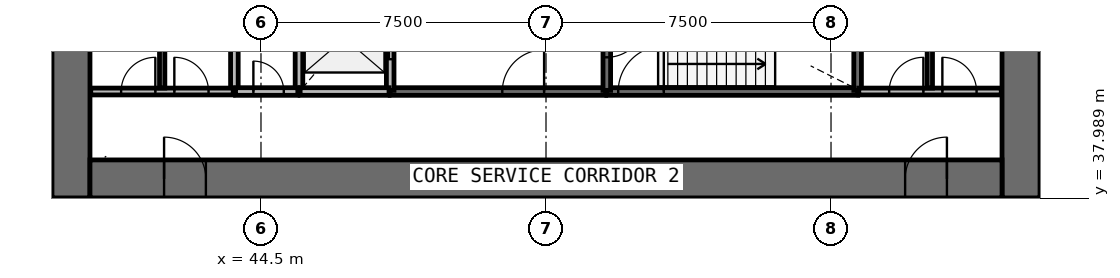
"""IFC4 building model, lengths in metres.
Left out: names, types, materials, properties, quantities, classifications, styles, units other than length and angle.
Written with IfcOpenShell. Run it as: python <this file> out.ifc"""

import sys

from ifc_helpers import new_model, si_unit, direction, frame, frame_2d, origin, place, context, subcontext, project, spatial, rectangle, extrude, source, transform, mapped, element, fill, save


model = new_model("IFC4")
c1 = context("Model", 3, precision=1e-05, world=origin(), true_north=direction((0.0, 1.0)))
c2 = subcontext(c1, "Body", "Model", "MODEL_VIEW")
j1 = project(units=[si_unit("LENGTHUNIT", "METRE"), si_unit("PLANEANGLEUNIT", "RADIAN")], contexts=[c1])
p1 = place(None, origin())
s1 = spatial("IfcSite", under=j1, at=p1, CompositionType="ELEMENT")
p2 = place(p1, origin())
s2 = spatial("IfcBuilding", under=s1, at=p2, CompositionType="ELEMENT")
p3 = place(p2, frame((0.0, 0.0, 66.6)))
s3 = spatial("IfcBuildingStorey", under=s2, at=p3, CompositionType="ELEMENT", Elevation=66.6)
p4 = place(p3, frame((64.5, 38.0, 0.0), z_axis=(0.0, 0.0, 1.0), x_axis=(0.0, 1.0, 0.0)))
e1 = element("IfcWall", 1, at=p4, inside=s3, PredefinedType="SHEAR", context=c2, shape_type="SweptSolid", body=[
    extrude(rectangle(XDim=20.0, YDim=1.0, at=frame_2d((10.0, 0.0))), origin(), (0.0, 0.0, 1.0), 4.4),
])
p5 = place(p4, frame((9.1, 0.0, 0.0)))
e2 = element("IfcOpeningElement", 2, at=p5, cuts=e1, PredefinedType="OPENING", context=c2, shape_type="SweptSolid", body=[
    extrude(rectangle(XDim=1.8, YDim=2.1, at=frame_2d((0.9, 1.05))), frame((0.0, 0.51, 0.0), z_axis=(0.0, -1.0, 0.0), x_axis=(1.0, 0.0, 0.0)), (0.0, 0.0, 1.0), 1.02),
])
p6 = place(p3, frame((39.5, 58.0, 0.0), z_axis=(0.0, 0.0, 1.0), x_axis=(0.0, -1.0, 0.0)))
e3 = element("IfcWall", 3, at=p6, inside=s3, PredefinedType="SHEAR", context=c2, shape_type="SweptSolid", body=[
    extrude(rectangle(XDim=20.0, YDim=1.0, at=frame_2d((10.0, 0.0))), origin(), (0.0, 0.0, 1.0), 4.4),
])
p7 = place(p6, frame((9.1, 0.0, 0.0)))
e4 = element("IfcOpeningElement", 4, at=p7, cuts=e3, PredefinedType="OPENING", context=c2, shape_type="SweptSolid", body=[
    extrude(rectangle(XDim=1.8, YDim=2.1, at=frame_2d((0.9, 1.05))), frame((0.0, 0.51, 0.0), z_axis=(0.0, -1.0, 0.0), x_axis=(1.0, 0.0, 0.0)), (0.0, 0.0, 1.0), 1.02),
])
p8 = place(p3, frame((40.0, 38.5, 0.0), z_axis=(0.0, 0.0, 1.0), x_axis=(1.0, 0.0, 0.0)))
e5 = element("IfcWall", 5, at=p8, inside=s3, PredefinedType="SHEAR", context=c2, shape_type="SweptSolid", body=[
    extrude(rectangle(XDim=24.0, YDim=1.0, at=frame_2d((12.0, 0.0))), origin(), (0.0, 0.0, 1.0), 4.4),
])
p9 = place(p8, frame((21.45, 0.0, 0.0)))
e6 = element("IfcOpeningElement", 6, at=p9, cuts=e5, PredefinedType="OPENING", context=c2, shape_type="SweptSolid", body=[
    extrude(rectangle(XDim=1.1, YDim=2.1, at=frame_2d((0.55, 1.05))), frame((0.0, 0.51, 0.0), z_axis=(0.0, -1.0, 0.0), x_axis=(1.0, 0.0, 0.0)), (0.0, 0.0, 1.0), 1.02),
])
p10 = place(p8, frame((1.95, 0.0, 0.0)))
e7 = element("IfcOpeningElement", 7, at=p10, cuts=e5, PredefinedType="OPENING", context=c2, shape_type="SweptSolid", body=[
    extrude(rectangle(XDim=1.1, YDim=2.1, at=frame_2d((0.55, 1.05))), frame((0.0, 0.51, 0.0), z_axis=(0.0, -1.0, 0.0), x_axis=(1.0, 0.0, 0.0)), (0.0, 0.0, 1.0), 1.02),
])
p11 = place(p3, frame((53.6, 40.8, 0.0), z_axis=(0.0, 0.0, 1.0), x_axis=(1.0, 0.0, 0.0)))
e8 = element("IfcWall", 8, at=p11, inside=s3, PredefinedType="SOLIDWALL", context=c2, shape_type="SweptSolid", body=[
    extrude(rectangle(XDim=6.6, YDim=0.2, at=frame_2d((3.3, 0.0))), origin(), (0.0, 0.0, 1.0), 3.95),
])
p12 = place(p11, frame((0.3, 0.0, 0.0)))
e9 = element("IfcOpeningElement", 9, at=p12, cuts=e8, PredefinedType="OPENING", context=c2, shape_type="SweptSolid", body=[
    extrude(rectangle(XDim=1.2, YDim=2.1, at=frame_2d((0.6, 1.05))), frame((0.0, 0.11, 0.0), z_axis=(0.0, -1.0, 0.0), x_axis=(1.0, 0.0, 0.0)), (0.0, 0.0, 1.0), 0.22),
])
p13 = place(p3, frame((47.9, 40.8, 0.0), z_axis=(0.0, 0.0, 1.0), x_axis=(1.0, 0.0, 0.0)))
e10 = element("IfcWall", 10, at=p13, inside=s3, PredefinedType="SOLIDWALL", context=c2, shape_type="SweptSolid", body=[
    extrude(rectangle(XDim=5.67, YDim=0.2, at=frame_2d((2.835, 0.0))), origin(), (0.0, 0.0, 1.0), 3.95),
])
p14 = place(p13, frame((2.95, 0.0, 0.0)))
e11 = element("IfcOpeningElement", 11, at=p14, cuts=e10, PredefinedType="OPENING", context=c2, shape_type="SweptSolid", body=[
    extrude(rectangle(XDim=1.1, YDim=2.1, at=frame_2d((0.55, 1.05))), frame((0.0, 0.11, 0.0), z_axis=(0.0, -1.0, 0.0), x_axis=(1.0, 0.0, 0.0)), (0.0, 0.0, 1.0), 0.22),
])
for number, where, z_axis, x_axis in (
    (12, (43.8, 43.6, 0.0), (0.0, 0.0, 1.0), (0.0, -1.0, 0.0)),
    (13, (45.5, 43.6, 0.0), (0.0, 0.0, 1.0), (0.0, -1.0, 0.0)),
):
    element("IfcWall", number, at=place(p3, frame(where, z_axis=z_axis, x_axis=x_axis)), inside=s3, PredefinedType="SOLIDWALL", context=c2, shape_type="SweptSolid", body=[
        extrude(rectangle(XDim=2.8, YDim=0.2, at=frame_2d((1.4, 0.0))), origin(), (0.0, 0.0, 1.0), 3.95),
    ])
p15 = place(p3, frame((47.9, 40.83, 0.0), z_axis=(0.0, 0.0, 1.0), x_axis=(0.0, 1.0, 0.0)))
e14 = element("IfcWall", 14, at=p15, inside=s3, PredefinedType="SOLIDWALL", context=c2, shape_type="SweptSolid", body=[
    extrude(rectangle(XDim=2.77, YDim=0.2, at=frame_2d((1.385, 0.0))), origin(), (0.0, 0.0, 1.0), 3.95),
])
p16 = place(p15, frame((0.82, 0.0, 0.0)))
e15 = element("IfcOpeningElement", 15, at=p16, cuts=e14, PredefinedType="OPENING", context=c2, shape_type="SweptSolid", body=[
    extrude(rectangle(XDim=1.1, YDim=2.1, at=frame_2d((0.55, 1.05))), frame((0.0, 0.11, 0.0), z_axis=(0.0, -1.0, 0.0), x_axis=(1.0, 0.0, 0.0)), (0.0, 0.0, 1.0), 0.22),
])
p17 = place(p3, frame((60.2, 40.83, 0.0), z_axis=(0.0, 0.0, 1.0), x_axis=(0.0, 1.0, 0.0)))
e16 = element("IfcWall", 16, at=p17, inside=s3, PredefinedType="SOLIDWALL", context=c2, shape_type="SweptSolid", body=[
    extrude(rectangle(XDim=2.77, YDim=0.2, at=frame_2d((1.385, 0.0))), origin(), (0.0, 0.0, 1.0), 3.95),
])
p18 = place(p3, frame((53.6, 43.6, 0.0), z_axis=(0.0, 0.0, 1.0), x_axis=(0.0, -1.0, 0.0)))
e17 = element("IfcWall", 17, at=p18, inside=s3, PredefinedType="SOLIDWALL", context=c2, shape_type="SweptSolid", body=[
    extrude(rectangle(XDim=2.77, YDim=0.2, at=frame_2d((1.385, 0.0))), origin(), (0.0, 0.0, 1.0), 3.95),
])
p19 = place(p18, frame((0.9, 0.0, 0.0)))
e18 = element("IfcOpeningElement", 18, at=p19, cuts=e17, PredefinedType="OPENING", context=c2, shape_type="SweptSolid", body=[
    extrude(rectangle(XDim=1.0, YDim=2.1, at=frame_2d((0.5, 1.05))), frame((0.0, 0.11, 0.0), z_axis=(0.0, -1.0, 0.0), x_axis=(1.0, 0.0, 0.0)), (0.0, 0.0, 1.0), 0.22),
])
p20 = place(p3, frame((45.53, 40.8, 0.0), z_axis=(0.0, 0.0, 1.0), x_axis=(1.0, 0.0, 0.0)))
e19 = element("IfcWall", 19, at=p20, inside=s3, PredefinedType="SOLIDWALL", context=c2, shape_type="SweptSolid", body=[
    extrude(rectangle(XDim=2.34, YDim=0.2, at=frame_2d((1.17, 0.0))), origin(), (0.0, 0.0, 1.0), 3.95),
])
p21 = place(p3, frame((43.83, 40.8, 0.0), z_axis=(0.0, 0.0, 1.0), x_axis=(1.0, 0.0, 0.0)))
e20 = element("IfcWall", 20, at=p21, inside=s3, PredefinedType="SOLIDWALL", context=c2, shape_type="SweptSolid", body=[
    extrude(rectangle(XDim=1.64, YDim=0.2, at=frame_2d((0.82, 0.0))), origin(), (0.0, 0.0, 1.0), 3.95),
])
p22 = place(p21, frame((0.47, 0.0, 0.0)))
e21 = element("IfcOpeningElement", 21, at=p22, cuts=e20, PredefinedType="OPENING", context=c2, shape_type="SweptSolid", body=[
    extrude(rectangle(XDim=0.8, YDim=2.1, at=frame_2d((0.4, 1.05))), frame((0.0, 0.11, 0.0), z_axis=(0.0, -1.0, 0.0), x_axis=(1.0, 0.0, 0.0)), (0.0, 0.0, 1.0), 0.22),
])
p23 = place(p3, frame((40.02, 40.8, 0.0), z_axis=(0.0, 0.0, 1.0), x_axis=(1.0, 0.0, 0.0)))
e22 = element("IfcWall", 22, at=p23, inside=s3, PredefinedType="PARTITIONING", context=c2, shape_type="SweptSolid", body=[
    extrude(rectangle(XDim=3.75, YDim=0.18, at=frame_2d((1.875, 0.0))), origin(), (0.0, 0.0, 1.0), 3.95),
])
p24 = place(p23, frame((0.8, 0.0, 0.0)))
e23 = element("IfcOpeningElement", 23, at=p24, cuts=e22, PredefinedType="OPENING", context=c2, shape_type="SweptSolid", body=[
    extrude(rectangle(XDim=0.9, YDim=2.1, at=frame_2d((0.45, 1.05))), frame((0.0, 0.1, 0.0), z_axis=(0.0, -1.0, 0.0), x_axis=(1.0, 0.0, 0.0)), (0.0, 0.0, 1.0), 0.2),
])
p25 = place(p23, frame((2.2, 0.0, 0.0)))
e24 = element("IfcOpeningElement", 24, at=p25, cuts=e22, PredefinedType="OPENING", context=c2, shape_type="SweptSolid", body=[
    extrude(rectangle(XDim=0.9, YDim=2.1, at=frame_2d((0.45, 1.05))), frame((0.0, 0.1, 0.0), z_axis=(0.0, -1.0, 0.0), x_axis=(1.0, 0.0, 0.0)), (0.0, 0.0, 1.0), 0.2),
])
p26 = place(p3, frame((60.23, 40.8, 0.0), z_axis=(0.0, 0.0, 1.0), x_axis=(1.0, 0.0, 0.0)))
e25 = element("IfcWall", 25, at=p26, inside=s3, PredefinedType="PARTITIONING", context=c2, shape_type="SweptSolid", body=[
    extrude(rectangle(XDim=3.75, YDim=0.18, at=frame_2d((1.875, 0.0))), origin(), (0.0, 0.0, 1.0), 3.95),
])
p27 = place(p26, frame((0.8, 0.0, 0.0)))
e26 = element("IfcOpeningElement", 26, at=p27, cuts=e25, PredefinedType="OPENING", context=c2, shape_type="SweptSolid", body=[
    extrude(rectangle(XDim=0.9, YDim=2.1, at=frame_2d((0.45, 1.05))), frame((0.0, 0.1, 0.0), z_axis=(0.0, -1.0, 0.0), x_axis=(1.0, 0.0, 0.0)), (0.0, 0.0, 1.0), 0.2),
])
p28 = place(p26, frame((2.2, 0.0, 0.0)))
e27 = element("IfcOpeningElement", 27, at=p28, cuts=e25, PredefinedType="OPENING", context=c2, shape_type="SweptSolid", body=[
    extrude(rectangle(XDim=0.9, YDim=2.1, at=frame_2d((0.45, 1.05))), frame((0.0, 0.1, 0.0), z_axis=(0.0, -1.0, 0.0), x_axis=(1.0, 0.0, 0.0)), (0.0, 0.0, 1.0), 0.2),
])
for number, where, z_axis, x_axis in (
    (28, (41.9, 40.89, 0.0), (0.0, 0.0, 1.0), (0.0, 1.0, 0.0)),
    (29, (62.1, 40.89, 0.0), (0.0, 0.0, 1.0), (0.0, 1.0, 0.0)),
):
    element("IfcWall", number, at=place(p3, frame(where, z_axis=z_axis, x_axis=x_axis)), inside=s3, PredefinedType="PARTITIONING", context=c2, shape_type="SweptSolid", body=[
        extrude(rectangle(XDim=2.71, YDim=0.14, at=frame_2d((1.355, 0.0))), origin(), (0.0, 0.0, 1.0), 3.05),
    ])
m1 = source(origin(), c2, "Body", "SweptSolid", [
    extrude(rectangle(XDim=1.1, YDim=2.1, at=frame_2d((0.55, 1.05))), frame((0.0, 0.025, 0.0), z_axis=(0.0, -1.0, 0.0), x_axis=(1.0, 0.0, 0.0)), (0.0, 0.0, 1.0), 0.05),
])
p29 = place(p16, origin())
e30 = element("IfcDoor", 30, at=p29, inside=s3, OperationType="DOUBLE_DOOR_SLIDING", PredefinedType="USERDEFINED", context=c2, shape_type="MappedRepresentation", body=[
    mapped(m1, transform((0.0, 0.0, 0.0), scale=1.0)),
])
fill(e15, e30)
m2 = source(origin(), c2, "Body", "SweptSolid", [
    extrude(rectangle(XDim=1.2, YDim=2.1, at=frame_2d((0.6, 1.05))), frame((0.0, 0.025, 0.0), z_axis=(0.0, -1.0, 0.0), x_axis=(1.0, 0.0, 0.0)), (0.0, 0.0, 1.0), 0.05),
])
p30 = place(p12, origin())
e31 = element("IfcDoor", 31, at=p30, inside=s3, OperationType="SINGLE_SWING_RIGHT", PredefinedType="DOOR", context=c2, shape_type="MappedRepresentation", body=[
    mapped(m2, transform((0.0, 0.0, 0.0), scale=1.0)),
])
fill(e9, e31)
m3 = source(origin(), c2, "Body", "SweptSolid", [
    extrude(rectangle(XDim=1.0, YDim=2.1, at=frame_2d((0.5, 1.05))), frame((0.0, 0.025, 0.0), z_axis=(0.0, -1.0, 0.0), x_axis=(1.0, 0.0, 0.0)), (0.0, 0.0, 1.0), 0.05),
])
p31 = place(p19, origin())
e32 = element("IfcDoor", 32, at=p31, inside=s3, OperationType="SINGLE_SWING_LEFT", PredefinedType="DOOR", context=c2, shape_type="MappedRepresentation", body=[
    mapped(m3, transform((0.0, 0.0, 0.0), scale=1.0)),
])
fill(e18, e32)
m4 = source(origin(), c2, "Body", "SweptSolid", [
    extrude(rectangle(XDim=1.1, YDim=2.1, at=frame_2d((0.55, 1.05))), frame((0.0, 0.025, 0.0), z_axis=(0.0, -1.0, 0.0), x_axis=(1.0, 0.0, 0.0)), (0.0, 0.0, 1.0), 0.05),
])
p32 = place(p14, origin())
e33 = element("IfcDoor", 33, at=p32, inside=s3, OperationType="SINGLE_SWING_RIGHT", PredefinedType="DOOR", context=c2, shape_type="MappedRepresentation", body=[
    mapped(m4, transform((0.0, 0.0, 0.0), scale=1.0)),
])
fill(e11, e33)
m5 = source(origin(), c2, "Body", "SweptSolid", [
    extrude(rectangle(XDim=0.8, YDim=2.1, at=frame_2d((0.4, 1.05))), frame((0.0, 0.025, 0.0), z_axis=(0.0, -1.0, 0.0), x_axis=(1.0, 0.0, 0.0)), (0.0, 0.0, 1.0), 0.05),
])
p33 = place(p22, origin())
e34 = element("IfcDoor", 34, at=p33, inside=s3, OperationType="SINGLE_SWING_LEFT", PredefinedType="DOOR", context=c2, shape_type="MappedRepresentation", body=[
    mapped(m5, transform((0.0, 0.0, 0.0), scale=1.0)),
])
fill(e21, e34)
m6 = source(origin(), c2, "Body", "SweptSolid", [
    extrude(rectangle(XDim=1.1, YDim=2.1, at=frame_2d((0.55, 1.05))), frame((0.0, 0.025, 0.0), z_axis=(0.0, -1.0, 0.0), x_axis=(1.0, 0.0, 0.0)), (0.0, 0.0, 1.0), 0.05),
])
p34 = place(p9, origin())
e35 = element("IfcDoor", 35, at=p34, inside=s3, OperationType="SINGLE_SWING_RIGHT", PredefinedType="DOOR", context=c2, shape_type="MappedRepresentation", body=[
    mapped(m6, transform((0.0, 0.0, 0.0), scale=1.0)),
])
fill(e6, e35)
p35 = place(p10, origin())
e36 = element("IfcDoor", 36, at=p35, inside=s3, OperationType="SINGLE_SWING_LEFT", PredefinedType="DOOR", context=c2, shape_type="MappedRepresentation", body=[
    mapped(m6, transform((0.0, 0.0, 0.0), scale=1.0)),
])
fill(e7, e36)
m7 = source(origin(), c2, "Body", "SweptSolid", [
    extrude(rectangle(XDim=0.9, YDim=2.1, at=frame_2d((0.45, 1.05))), frame((0.0, 0.025, 0.0), z_axis=(0.0, -1.0, 0.0), x_axis=(1.0, 0.0, 0.0)), (0.0, 0.0, 1.0), 0.05),
])
p36 = place(p24, origin())
e37 = element("IfcDoor", 37, at=p36, inside=s3, OperationType="SINGLE_SWING_RIGHT", PredefinedType="DOOR", context=c2, shape_type="MappedRepresentation", body=[
    mapped(m7, transform((0.0, 0.0, 0.0), scale=1.0)),
])
fill(e23, e37)
p37 = place(p25, origin())
e38 = element("IfcDoor", 38, at=p37, inside=s3, OperationType="SINGLE_SWING_LEFT", PredefinedType="DOOR", context=c2, shape_type="MappedRepresentation", body=[
    mapped(m7, transform((0.0, 0.0, 0.0), scale=1.0)),
])
fill(e24, e38)
p38 = place(p27, origin())
e39 = element("IfcDoor", 39, at=p38, inside=s3, OperationType="SINGLE_SWING_RIGHT", PredefinedType="DOOR", context=c2, shape_type="MappedRepresentation", body=[
    mapped(m7, transform((0.0, 0.0, 0.0), scale=1.0)),
])
fill(e26, e39)
p39 = place(p28, origin())
e40 = element("IfcDoor", 40, at=p39, inside=s3, OperationType="SINGLE_SWING_LEFT", PredefinedType="DOOR", context=c2, shape_type="MappedRepresentation", body=[
    mapped(m7, transform((0.0, 0.0, 0.0), scale=1.0)),
])
fill(e27, e40)
save(model, sys.argv[1])
